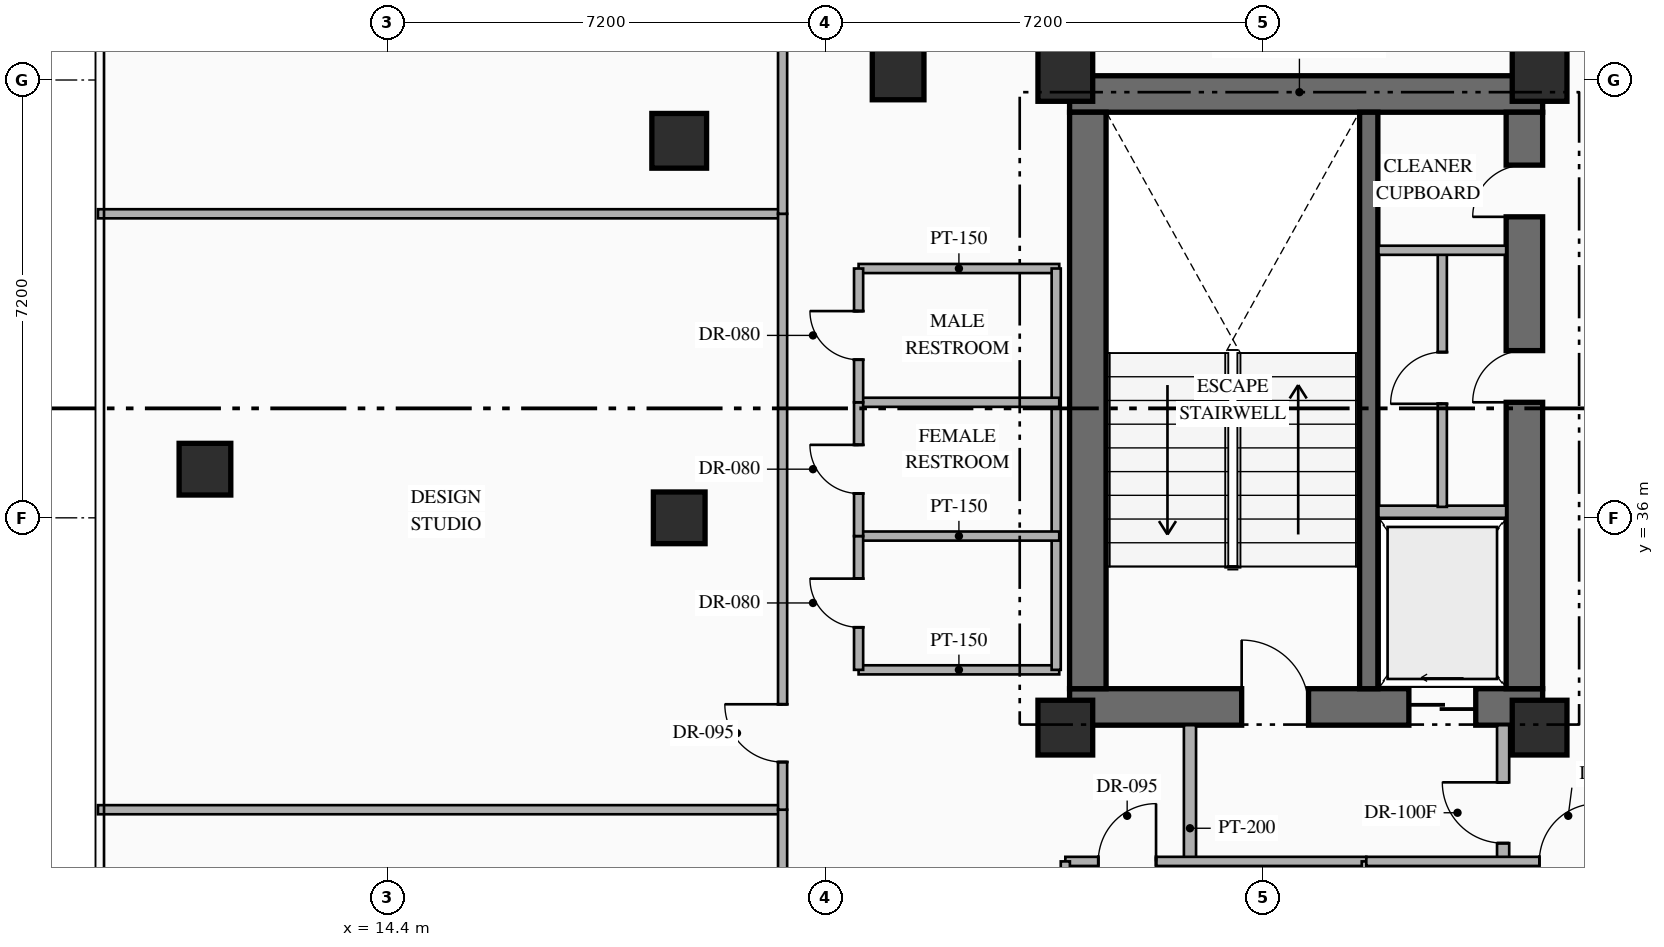
"""IFC4 building model, lengths in metres.
Left out: names, types, materials, properties, quantities, classifications, styles, units other than length and angle.
Written with IfcOpenShell. Run it as: python <this file> out.ifc"""

import sys

from ifc_helpers import new_model, si_unit, direction, frame, frame_2d, origin, origin_2d, place, context, subcontext, project, spatial, rectangle, hollow_rectangle, extrude, element, fill, save


model = new_model("IFC4")
c1 = context("Model", 3, precision=1e-05, world=origin(), true_north=direction((0.0, 1.0)))
c2 = subcontext(c1, "Body", "Model", "MODEL_VIEW")
j1 = project(units=[si_unit("LENGTHUNIT", "METRE"), si_unit("PLANEANGLEUNIT", "RADIAN")], contexts=[c1])
p1 = place(None, origin())
s1 = spatial("IfcSite", under=j1, at=p1, CompositionType="ELEMENT")
p2 = place(p1, origin())
s2 = spatial("IfcBuilding", under=s1, at=p2, CompositionType="ELEMENT")
p3 = place(p2, frame((0.0, 0.0, 119.25)))
s3 = spatial("IfcBuildingStorey", under=s2, at=p3, CompositionType="ELEMENT", Elevation=119.25)
p4 = place(p3, frame((25.62, 32.89, 0.0), z_axis=(0.0, 0.0, 1.0), x_axis=(1.0, 0.0, 0.0)))
e1 = element("IfcWall", 1, at=p4, inside=s3, PredefinedType="SHEAR", context=c2, shape_type="SweptSolid", body=[
    extrude(rectangle(XDim=7.78, YDim=0.6, at=frame_2d((3.89, 0.0))), origin(), (0.0, 0.0, 1.0), 3.6),
])
p5 = place(p4, frame((2.83, 0.0, 0.0)))
e2 = element("IfcOpeningElement", 2, at=p5, cuts=e1, PredefinedType="OPENING", context=c2, shape_type="SweptSolid", body=[
    extrude(rectangle(XDim=1.1, YDim=2.2, at=frame_2d((0.55, 1.1))), frame((0.0, 0.31, 0.0), z_axis=(0.0, -1.0, 0.0), x_axis=(1.0, 0.0, 0.0)), (0.0, 0.0, 1.0), 0.62),
])
p6 = place(p4, frame((5.58, 0.0, 0.0)))
e3 = element("IfcOpeningElement", 3, at=p6, cuts=e1, PredefinedType="OPENING", context=c2, shape_type="SweptSolid", body=[
    extrude(rectangle(XDim=1.1, YDim=2.15, at=frame_2d((0.55, 1.075))), frame((0.0, 0.31, 0.0), z_axis=(0.0, -1.0, 0.0), x_axis=(1.0, 0.0, 0.0)), (0.0, 0.0, 1.0), 0.62),
])
p7 = place(p3, frame((25.62, 42.97, 0.0), z_axis=(0.0, 0.0, 1.0), x_axis=(1.0, 0.0, 0.0)))
e4 = element("IfcWall", 4, at=p7, inside=s3, PredefinedType="SHEAR", context=c2, shape_type="SweptSolid", body=[
    extrude(rectangle(XDim=7.78, YDim=0.6, at=frame_2d((3.89, 0.0))), origin(), (0.0, 0.0, 1.0), 3.6),
])
p8 = place(p3, frame((25.92, 33.19, 0.0), z_axis=(0.0, 0.0, 1.0), x_axis=(0.0, 1.0, 0.0)))
e5 = element("IfcWall", 5, at=p8, inside=s3, PredefinedType="SHEAR", context=c2, shape_type="SweptSolid", body=[
    extrude(rectangle(XDim=9.48, YDim=0.6, at=frame_2d((4.74, 0.0))), origin(), (0.0, 0.0, 1.0), 3.6),
])
p9 = place(p3, frame((33.1, 33.19, 0.0), z_axis=(0.0, 0.0, 1.0), x_axis=(0.0, 1.0, 0.0)))
e6 = element("IfcWall", 6, at=p9, inside=s3, PredefinedType="SHEAR", context=c2, shape_type="SweptSolid", body=[
    extrude(rectangle(XDim=9.48, YDim=0.6, at=frame_2d((4.74, 0.0))), origin(), (0.0, 0.0, 1.0), 3.6),
])
p10 = place(p9, frame((4.71, 0.0, 0.0)))
e7 = element("IfcOpeningElement", 7, at=p10, cuts=e6, PredefinedType="OPENING", context=c2, shape_type="SweptSolid", body=[
    extrude(rectangle(XDim=0.85, YDim=2.08, at=frame_2d((0.425, 1.04))), frame((0.0, 0.31, 0.0), z_axis=(0.0, -1.0, 0.0), x_axis=(1.0, 0.0, 0.0)), (0.0, 0.0, 1.0), 0.62),
])
p11 = place(p9, frame((7.76, 0.0, 0.0)))
e8 = element("IfcOpeningElement", 8, at=p11, cuts=e6, PredefinedType="OPENING", context=c2, shape_type="SweptSolid", body=[
    extrude(rectangle(XDim=0.85, YDim=2.08, at=frame_2d((0.425, 1.04))), frame((0.0, 0.31, 0.0), z_axis=(0.0, -1.0, 0.0), x_axis=(1.0, 0.0, 0.0)), (0.0, 0.0, 1.0), 0.62),
])
p12 = place(p3, frame((30.54, 33.19, 0.0), z_axis=(0.0, 0.0, 1.0), x_axis=(0.0, 1.0, 0.0)))
e9 = element("IfcWall", 9, at=p12, inside=s3, PredefinedType="SHEAR", context=c2, shape_type="SweptSolid", body=[
    extrude(rectangle(XDim=9.48, YDim=0.3, at=frame_2d((4.74, 0.0))), origin(), (0.0, 0.0, 1.0), 3.6),
])
for number, where, z_axis, x_axis in (
    (10, (25.55, 32.55, 0.0), (0.0, 0.0, 1.0), (1.0, 0.0, 0.0)),
    (11, (33.35, 32.55, 0.0), (0.0, 0.0, 1.0), (1.0, 0.0, 0.0)),
    (12, (25.55, 43.3, 0.0), (0.0, 0.0, 1.0), (1.0, 0.0, 0.0)),
    (13, (33.35, 43.3, 0.0), (0.0, 0.0, 1.0), (1.0, 0.0, 0.0)),
):
    element("IfcColumn", number, at=place(p3, frame(where, z_axis=z_axis, x_axis=x_axis)), inside=s3, PredefinedType="COLUMN", context=c2, shape_type="SweptSolid", body=[
        extrude(rectangle(XDim=0.9, YDim=0.9, at=origin_2d()), origin(), (0.0, 0.0, 1.0), 3.6),
    ])
p13 = place(p3, frame((19.2, 42.2, 0.0), z_axis=(0.0, 0.0, 1.0), x_axis=(1.0, 0.0, 0.0)))
e14 = element("IfcColumn", 14, at=p13, inside=s3, PredefinedType="COLUMN", context=c2, shape_type="SweptSolid", body=[
    extrude(hollow_rectangle(XDim=0.9, YDim=0.9, WallThickness=0.036, at=origin_2d()), origin(), (0.0, 0.0, 1.0), 3.6),
])
for number, where, z_axis, x_axis in (
    (15, (22.8, 43.3, 0.0), (0.0, 0.0, 1.0), (1.0, 0.0, 0.0)),
    (16, (11.4, 36.8, 0.0), (0.0, 0.0, 1.0), (1.0, 0.0, 0.0)),
    (17, (19.2, 36.0, 0.0), (0.0, 0.0, 1.0), (1.0, 0.0, 0.0)),
):
    element("IfcColumn", number, at=place(p3, frame(where, z_axis=z_axis, x_axis=x_axis)), inside=s3, PredefinedType="COLUMN", context=c2, shape_type="SweptSolid", body=[
        extrude(hollow_rectangle(XDim=0.85, YDim=0.85, WallThickness=0.032, at=origin_2d()), origin(), (0.0, 0.0, 1.0), 3.6),
    ])
p14 = place(p3, frame((30.7, 36.1, 0.0), z_axis=(0.0, 0.0, 1.0), x_axis=(1.0, 0.0, 0.0)))
e18 = element("IfcWall", 18, at=p14, inside=s3, PredefinedType="STANDARD", context=c2, shape_type="SweptSolid", body=[
    extrude(rectangle(XDim=2.1, YDim=0.2, at=frame_2d((1.05, 0.0))), origin(), (0.0, 0.0, 1.0), 3.35),
])
p15 = place(p3, frame((31.75, 36.18, 0.0), z_axis=(0.0, 0.0, 1.0), x_axis=(0.0, 1.0, 0.0)))
e19 = element("IfcWall", 19, at=p15, inside=s3, PredefinedType="PARTITIONING", context=c2, shape_type="SweptSolid", body=[
    extrude(rectangle(XDim=4.24, YDim=0.15, at=frame_2d((2.12, 0.0))), origin(), (0.0, 0.0, 1.0), 3.35),
])
p16 = place(p15, frame((1.695, 0.0, 0.0)))
e20 = element("IfcOpeningElement", 20, at=p16, cuts=e19, PredefinedType="OPENING", context=c2, shape_type="SweptSolid", body=[
    extrude(rectangle(XDim=0.85, YDim=2.08, at=frame_2d((0.425, 1.04))), frame((0.0, 0.085, 0.0), z_axis=(0.0, -1.0, 0.0), x_axis=(1.0, 0.0, 0.0)), (0.0, 0.0, 1.0), 0.17),
])
p17 = place(p3, frame((30.7, 40.4, 0.0), z_axis=(0.0, 0.0, 1.0), x_axis=(1.0, 0.0, 0.0)))
e21 = element("IfcWall", 21, at=p17, inside=s3, PredefinedType="PARTITIONING", context=c2, shape_type="SweptSolid", body=[
    extrude(rectangle(XDim=2.1, YDim=0.15, at=frame_2d((1.05, 0.0))), origin(), (0.0, 0.0, 1.0), 3.35),
])
p18 = place(p3, frame((27.6, 29.2, 0.0), z_axis=(0.0, 0.0, 1.0), x_axis=(0.0, 1.0, 0.0)))
e22 = element("IfcWall", 22, at=p18, inside=s3, PredefinedType="STANDARD", context=c2, shape_type="SweptSolid", body=[
    extrude(rectangle(XDim=3.39, YDim=0.2, at=frame_2d((1.695, 0.0))), origin(), (0.0, 0.0, 1.0), 3.35),
])
p19 = place(p3, frame((32.75, 29.2, 0.0), z_axis=(0.0, 0.0, 1.0), x_axis=(0.0, 1.0, 0.0)))
e23 = element("IfcWall", 23, at=p19, inside=s3, PredefinedType="STANDARD", context=c2, shape_type="SweptSolid", body=[
    extrude(rectangle(XDim=3.39, YDim=0.2, at=frame_2d((1.695, 0.0))), origin(), (0.0, 0.0, 1.0), 3.35),
])
p20 = place(p19, frame((1.45, 0.0, 0.0)))
e24 = element("IfcOpeningElement", 24, at=p20, cuts=e23, PredefinedType="OPENING", context=c2, shape_type="SweptSolid", body=[
    extrude(rectangle(XDim=1.0, YDim=2.2, at=frame_2d((0.5, 1.1))), frame((0.0, 0.11, 0.0), z_axis=(0.0, -1.0, 0.0), x_axis=(1.0, 0.0, 0.0)), (0.0, 0.0, 1.0), 0.22),
])
for number, where, z_axis, x_axis in (
    (25, (22.15, 33.5, 0.0), (0.0, 0.0, 1.0), (1.0, 0.0, 0.0)),
    (26, (22.15, 40.1, 0.0), (0.0, 0.0, 1.0), (1.0, 0.0, 0.0)),
):
    element("IfcWall", number, at=place(p3, frame(where, z_axis=z_axis, x_axis=x_axis)), inside=s3, PredefinedType="PARTITIONING", context=c2, shape_type="SweptSolid", body=[
        extrude(rectangle(XDim=3.3, YDim=0.15, at=frame_2d((1.65, 0.0))), origin(), (0.0, 0.0, 1.0), 3.35),
    ])
p21 = place(p3, frame((25.4, 33.5, 0.0), z_axis=(0.0, 0.0, 1.0), x_axis=(0.0, 1.0, 0.0)))
e27 = element("IfcWall", 27, at=p21, inside=s3, PredefinedType="PARTITIONING", context=c2, shape_type="SweptSolid", body=[
    extrude(rectangle(XDim=6.6, YDim=0.15, at=frame_2d((3.3, 0.0))), origin(), (0.0, 0.0, 1.0), 3.35),
])
for number, where, z_axis, x_axis in (
    (28, (22.15, 35.7, 0.0), (0.0, 0.0, 1.0), (1.0, 0.0, 0.0)),
    (29, (22.15, 37.9, 0.0), (0.0, 0.0, 1.0), (1.0, 0.0, 0.0)),
):
    element("IfcWall", number, at=place(p3, frame(where, z_axis=z_axis, x_axis=x_axis)), inside=s3, PredefinedType="PARTITIONING", context=c2, shape_type="SweptSolid", body=[
        extrude(rectangle(XDim=3.3, YDim=0.15, at=frame_2d((1.65, 0.0))), origin(), (0.0, 0.0, 1.0), 3.35),
    ])
p22 = place(p3, frame((22.15, 33.5, 0.0), z_axis=(0.0, 0.0, 1.0), x_axis=(0.0, 1.0, 0.0)))
e30 = element("IfcWall", 30, at=p22, inside=s3, PredefinedType="PARTITIONING", context=c2, shape_type="SweptSolid", body=[
    extrude(rectangle(XDim=2.2, YDim=0.15, at=frame_2d((1.1, 0.0))), origin(), (0.0, 0.0, 1.0), 3.35),
])
p23 = place(p22, frame((0.7, 0.0, 0.0)))
e31 = element("IfcOpeningElement", 31, at=p23, cuts=e30, PredefinedType="OPENING", context=c2, shape_type="SweptSolid", body=[
    extrude(rectangle(XDim=0.8, YDim=2.06, at=frame_2d((0.4, 1.03))), frame((0.0, 0.085, 0.0), z_axis=(0.0, -1.0, 0.0), x_axis=(1.0, 0.0, 0.0)), (0.0, 0.0, 1.0), 0.17),
])
p24 = place(p3, frame((22.15, 35.7, 0.0), z_axis=(0.0, 0.0, 1.0), x_axis=(0.0, 1.0, 0.0)))
e32 = element("IfcWall", 32, at=p24, inside=s3, PredefinedType="PARTITIONING", context=c2, shape_type="SweptSolid", body=[
    extrude(rectangle(XDim=2.2, YDim=0.15, at=frame_2d((1.1, 0.0))), origin(), (0.0, 0.0, 1.0), 3.35),
])
p25 = place(p24, frame((0.7, 0.0, 0.0)))
e33 = element("IfcOpeningElement", 33, at=p25, cuts=e32, PredefinedType="OPENING", context=c2, shape_type="SweptSolid", body=[
    extrude(rectangle(XDim=0.8, YDim=2.06, at=frame_2d((0.4, 1.03))), frame((0.0, 0.085, 0.0), z_axis=(0.0, -1.0, 0.0), x_axis=(1.0, 0.0, 0.0)), (0.0, 0.0, 1.0), 0.17),
])
p26 = place(p3, frame((22.15, 37.9, 0.0), z_axis=(0.0, 0.0, 1.0), x_axis=(0.0, 1.0, 0.0)))
e34 = element("IfcWall", 34, at=p26, inside=s3, PredefinedType="PARTITIONING", context=c2, shape_type="SweptSolid", body=[
    extrude(rectangle(XDim=2.2, YDim=0.15, at=frame_2d((1.1, 0.0))), origin(), (0.0, 0.0, 1.0), 3.35),
])
p27 = place(p26, frame((0.7, 0.0, 0.0)))
e35 = element("IfcOpeningElement", 35, at=p27, cuts=e34, PredefinedType="OPENING", context=c2, shape_type="SweptSolid", body=[
    extrude(rectangle(XDim=0.8, YDim=2.06, at=frame_2d((0.4, 1.03))), frame((0.0, 0.085, 0.0), z_axis=(0.0, -1.0, 0.0), x_axis=(1.0, 0.0, 0.0)), (0.0, 0.0, 1.0), 0.17),
])
p28 = place(p3, frame((25.55, 30.35, 0.0), z_axis=(0.0, 0.0, 1.0), x_axis=(1.0, 0.0, 0.0)))
e36 = element("IfcWall", 36, at=p28, inside=s3, PredefinedType="PARTITIONING", context=c2, shape_type="SweptSolid", body=[
    extrude(rectangle(XDim=4.95, YDim=0.15, at=frame_2d((2.475, 0.0))), origin(), (0.0, 0.0, 1.0), 3.35),
])
p29 = place(p28, frame((0.542, 0.0, 0.0)))
e37 = element("IfcOpeningElement", 37, at=p29, cuts=e36, PredefinedType="OPENING", context=c2, shape_type="SweptSolid", body=[
    extrude(rectangle(XDim=0.95, YDim=2.15, at=frame_2d((0.475, 1.075))), frame((0.0, 0.085, 0.0), z_axis=(0.0, -1.0, 0.0), x_axis=(1.0, 0.0, 0.0)), (0.0, 0.0, 1.0), 0.17),
])
p30 = place(p3, frame((25.55, 23.2, 0.0), z_axis=(0.0, 0.0, 1.0), x_axis=(0.0, 1.0, 0.0)))
e38 = element("IfcWall", 38, at=p30, inside=s3, PredefinedType="PARTITIONING", context=c2, shape_type="SweptSolid", body=[
    extrude(rectangle(XDim=7.15, YDim=0.15, at=frame_2d((3.575, 0.0))), origin(), (0.0, 0.0, 1.0), 2.695),
])
p31 = place(p3, frame((30.5, 23.2, 0.0), z_axis=(0.0, 0.0, 1.0), x_axis=(0.0, 1.0, 0.0)))
e39 = element("IfcWall", 39, at=p31, inside=s3, PredefinedType="PARTITIONING", context=c2, shape_type="SweptSolid", body=[
    extrude(rectangle(XDim=7.15, YDim=0.15, at=frame_2d((3.575, 0.0))), origin(), (0.0, 0.0, 1.0), 3.35),
])
p32 = place(p3, frame((30.5, 30.35, 0.0), z_axis=(0.0, 0.0, 1.0), x_axis=(1.0, 0.0, 0.0)))
e40 = element("IfcWall", 40, at=p32, inside=s3, PredefinedType="PARTITIONING", context=c2, shape_type="SweptSolid", body=[
    extrude(rectangle(XDim=4.45, YDim=0.15, at=frame_2d((2.225, 0.0))), origin(), (0.0, 0.0, 1.0), 3.35),
])
p33 = place(p32, frame((2.846, 0.0, 0.0)))
e41 = element("IfcOpeningElement", 41, at=p33, cuts=e40, PredefinedType="OPENING", context=c2, shape_type="SweptSolid", body=[
    extrude(rectangle(XDim=0.95, YDim=2.15, at=frame_2d((0.475, 1.075))), frame((0.0, 0.085, 0.0), z_axis=(0.0, -1.0, 0.0), x_axis=(1.0, 0.0, 0.0)), (0.0, 0.0, 1.0), 0.17),
])
p34 = place(p3, frame((9.64, 31.2, 0.0), z_axis=(0.0, 0.0, 1.0), x_axis=(1.0, 0.0, 0.0)))
e42 = element("IfcWall", 42, at=p34, inside=s3, PredefinedType="PARTITIONING", context=c2, shape_type="SweptSolid", body=[
    extrude(rectangle(XDim=11.26, YDim=0.15, at=frame_2d((5.63, 0.0))), origin(), (0.0, 0.0, 1.0), 3.35),
])
p35 = place(p3, frame((20.9, 23.44, 0.0), z_axis=(0.0, 0.0, 1.0), x_axis=(0.0, 1.0, 0.0)))
e43 = element("IfcWall", 43, at=p35, inside=s3, PredefinedType="PARTITIONING", context=c2, shape_type="SweptSolid", body=[
    extrude(rectangle(XDim=7.76, YDim=0.15, at=frame_2d((3.88, 0.0))), origin(), (0.0, 0.0, 1.0), 3.35),
])
p36 = place(p35, frame((3.405, 0.0, 0.0)))
e44 = element("IfcOpeningElement", 44, at=p36, cuts=e43, PredefinedType="OPENING", context=c2, shape_type="SweptSolid", body=[
    extrude(rectangle(XDim=0.95, YDim=2.15, at=frame_2d((0.475, 1.075))), frame((0.0, 0.085, 0.0), z_axis=(0.0, -1.0, 0.0), x_axis=(1.0, 0.0, 0.0)), (0.0, 0.0, 1.0), 0.17),
])
p37 = place(p3, frame((9.64, 41.0, 0.0), z_axis=(0.0, 0.0, 1.0), x_axis=(1.0, 0.0, 0.0)))
e45 = element("IfcWall", 45, at=p37, inside=s3, PredefinedType="PARTITIONING", context=c2, shape_type="SweptSolid", body=[
    extrude(rectangle(XDim=11.26, YDim=0.15, at=frame_2d((5.63, 0.0))), origin(), (0.0, 0.0, 1.0), 2.995),
])
p38 = place(p3, frame((20.9, 31.2, 0.0), z_axis=(0.0, 0.0, 1.0), x_axis=(0.0, 1.0, 0.0)))
e46 = element("IfcWall", 46, at=p38, inside=s3, PredefinedType="PARTITIONING", context=c2, shape_type="SweptSolid", body=[
    extrude(rectangle(XDim=9.8, YDim=0.15, at=frame_2d((4.9, 0.0))), origin(), (0.0, 0.0, 1.0), 3.35),
])
p39 = place(p38, frame((0.784, 0.0, 0.0)))
e47 = element("IfcOpeningElement", 47, at=p39, cuts=e46, PredefinedType="OPENING", context=c2, shape_type="SweptSolid", body=[
    extrude(rectangle(XDim=0.95, YDim=2.15, at=frame_2d((0.475, 1.075))), frame((0.0, 0.085, 0.0), z_axis=(0.0, -1.0, 0.0), x_axis=(1.0, 0.0, 0.0)), (0.0, 0.0, 1.0), 0.17),
])
p40 = place(p3, frame((20.9, 41.0, 0.0), z_axis=(0.0, 0.0, 1.0), x_axis=(0.0, 1.0, 0.0)))
e48 = element("IfcWall", 48, at=p40, inside=s3, PredefinedType="PARTITIONING", context=c2, shape_type="SweptSolid", body=[
    extrude(rectangle(XDim=9.36, YDim=0.15, at=frame_2d((4.68, 0.0))), origin(), (0.0, 0.0, 1.0), 3.35),
])
p41 = place(p40, frame((5.353, 0.0, 0.0)))
e49 = element("IfcOpeningElement", 49, at=p41, cuts=e48, PredefinedType="OPENING", context=c2, shape_type="SweptSolid", body=[
    extrude(rectangle(XDim=0.95, YDim=2.15, at=frame_2d((0.475, 1.075))), frame((0.0, 0.085, 0.0), z_axis=(0.0, -1.0, 0.0), x_axis=(1.0, 0.0, 0.0)), (0.0, 0.0, 1.0), 0.17),
])
p42 = place(p5, origin())
e50 = element("IfcDoor", 50, at=p42, inside=s3, OperationType="SINGLE_SWING_LEFT", PredefinedType="DOOR", context=c2, shape_type="SweptSolid", body=[
    extrude(rectangle(XDim=1.1, YDim=2.2, at=frame_2d((0.55, 1.1))), frame((0.0, 0.025, 0.0), z_axis=(0.0, -1.0, 0.0), x_axis=(1.0, 0.0, 0.0)), (0.0, 0.0, 1.0), 0.05),
])
fill(e2, e50)
p43 = place(p6, origin())
e51 = element("IfcDoor", 51, at=p43, inside=s3, OperationType="SLIDING_TO_LEFT", PredefinedType="USERDEFINED", context=c2, shape_type="SweptSolid", body=[
    extrude(rectangle(XDim=1.1, YDim=2.15, at=frame_2d((0.55, 1.075))), frame((0.0, 0.025, 0.0), z_axis=(0.0, -1.0, 0.0), x_axis=(1.0, 0.0, 0.0)), (0.0, 0.0, 1.0), 0.05),
])
fill(e3, e51)
p44 = place(p10, origin())
e52 = element("IfcDoor", 52, at=p44, inside=s3, OperationType="SINGLE_SWING_LEFT", PredefinedType="DOOR", context=c2, shape_type="SweptSolid", body=[
    extrude(rectangle(XDim=0.85, YDim=2.08, at=frame_2d((0.425, 1.04))), frame((0.0, 0.025, 0.0), z_axis=(0.0, -1.0, 0.0), x_axis=(1.0, 0.0, 0.0)), (0.0, 0.0, 1.0), 0.05),
])
fill(e7, e52)
p45 = place(p11, origin())
e53 = element("IfcDoor", 53, at=p45, inside=s3, OperationType="SINGLE_SWING_LEFT", PredefinedType="DOOR", context=c2, shape_type="SweptSolid", body=[
    extrude(rectangle(XDim=0.85, YDim=2.08, at=frame_2d((0.425, 1.04))), frame((0.0, 0.025, 0.0), z_axis=(0.0, -1.0, 0.0), x_axis=(1.0, 0.0, 0.0)), (0.0, 0.0, 1.0), 0.05),
])
fill(e8, e53)
p46 = place(p16, origin())
e54 = element("IfcDoor", 54, at=p46, inside=s3, OperationType="SINGLE_SWING_LEFT", PredefinedType="DOOR", context=c2, shape_type="SweptSolid", body=[
    extrude(rectangle(XDim=0.85, YDim=2.08, at=frame_2d((0.425, 1.04))), frame((0.0, 0.025, 0.0), z_axis=(0.0, -1.0, 0.0), x_axis=(1.0, 0.0, 0.0)), (0.0, 0.0, 1.0), 0.05),
])
fill(e20, e54)
p47 = place(p20, origin())
e55 = element("IfcDoor", 55, at=p47, inside=s3, OperationType="SINGLE_SWING_RIGHT", PredefinedType="DOOR", context=c2, shape_type="SweptSolid", body=[
    extrude(rectangle(XDim=1.0, YDim=2.2, at=frame_2d((0.5, 1.1))), frame((0.0, 0.025, 0.0), z_axis=(0.0, -1.0, 0.0), x_axis=(1.0, 0.0, 0.0)), (0.0, 0.0, 1.0), 0.05),
])
fill(e24, e55)
p48 = place(p23, origin())
e56 = element("IfcDoor", 56, at=p48, inside=s3, OperationType="SINGLE_SWING_RIGHT", PredefinedType="DOOR", context=c2, shape_type="SweptSolid", body=[
    extrude(rectangle(XDim=0.8, YDim=2.06, at=frame_2d((0.4, 1.03))), frame((0.0, 0.025, 0.0), z_axis=(0.0, -1.0, 0.0), x_axis=(1.0, 0.0, 0.0)), (0.0, 0.0, 1.0), 0.05),
])
fill(e31, e56)
p49 = place(p25, origin())
e57 = element("IfcDoor", 57, at=p49, inside=s3, OperationType="SINGLE_SWING_RIGHT", PredefinedType="DOOR", context=c2, shape_type="SweptSolid", body=[
    extrude(rectangle(XDim=0.8, YDim=2.06, at=frame_2d((0.4, 1.03))), frame((0.0, 0.025, 0.0), z_axis=(0.0, -1.0, 0.0), x_axis=(1.0, 0.0, 0.0)), (0.0, 0.0, 1.0), 0.05),
])
fill(e33, e57)
p50 = place(p27, origin())
e58 = element("IfcDoor", 58, at=p50, inside=s3, OperationType="SINGLE_SWING_RIGHT", PredefinedType="DOOR", context=c2, shape_type="SweptSolid", body=[
    extrude(rectangle(XDim=0.8, YDim=2.06, at=frame_2d((0.4, 1.03))), frame((0.0, 0.025, 0.0), z_axis=(0.0, -1.0, 0.0), x_axis=(1.0, 0.0, 0.0)), (0.0, 0.0, 1.0), 0.05),
])
fill(e35, e58)
p51 = place(p29, origin())
e59 = element("IfcDoor", 59, at=p51, inside=s3, OperationType="SINGLE_SWING_RIGHT", PredefinedType="DOOR", context=c2, shape_type="SweptSolid", body=[
    extrude(rectangle(XDim=0.95, YDim=2.15, at=frame_2d((0.475, 1.075))), frame((0.0, 0.025, 0.0), z_axis=(0.0, -1.0, 0.0), x_axis=(1.0, 0.0, 0.0)), (0.0, 0.0, 1.0), 0.05),
])
fill(e37, e59)
p52 = place(p33, origin())
e60 = element("IfcDoor", 60, at=p52, inside=s3, OperationType="SINGLE_SWING_RIGHT", PredefinedType="DOOR", context=c2, shape_type="SweptSolid", body=[
    extrude(rectangle(XDim=0.95, YDim=2.15, at=frame_2d((0.475, 1.075))), frame((0.0, 0.025, 0.0), z_axis=(0.0, -1.0, 0.0), x_axis=(1.0, 0.0, 0.0)), (0.0, 0.0, 1.0), 0.05),
])
fill(e41, e60)
p53 = place(p39, origin())
e61 = element("IfcDoor", 61, at=p53, inside=s3, OperationType="SINGLE_SWING_RIGHT", PredefinedType="DOOR", context=c2, shape_type="SweptSolid", body=[
    extrude(rectangle(XDim=0.95, YDim=2.15, at=frame_2d((0.475, 1.075))), frame((0.0, 0.025, 0.0), z_axis=(0.0, -1.0, 0.0), x_axis=(1.0, 0.0, 0.0)), (0.0, 0.0, 1.0), 0.05),
])
fill(e47, e61)
save(model, sys.argv[1])
